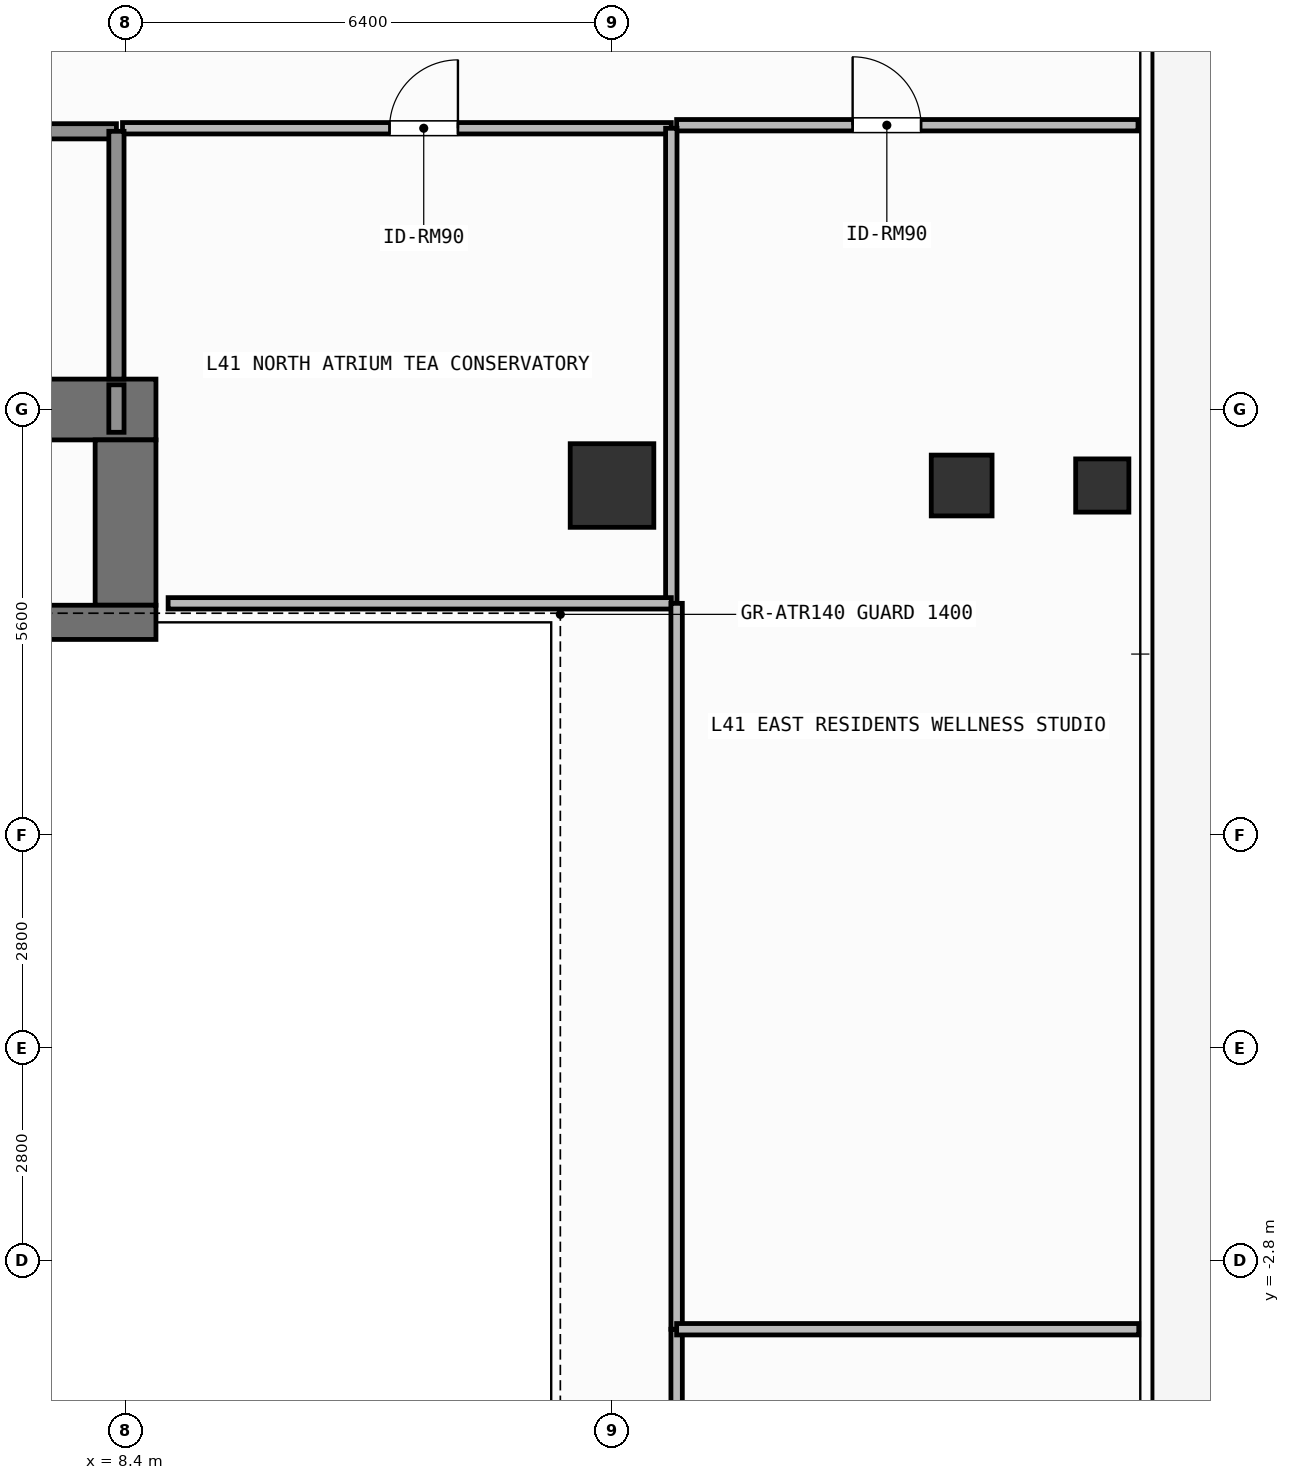
"""IFC4 building model, lengths in metres.
Left out: names, types, materials, properties, quantities, classifications, styles, units other than length and angle.
Written with IfcOpenShell. Run it as: python <this file> out.ifc"""

import sys

from ifc_helpers import new_model, si_unit, direction, frame, frame_2d, origin, origin_2d, place, context, subcontext, project, spatial, rectangle, hollow_rectangle, extrude, element, fill, save


model = new_model("IFC4")
c1 = context("Model", 3, precision=1e-05, world=origin(), true_north=direction((0.0, 1.0)))
c2 = subcontext(c1, "Body", "Model", "MODEL_VIEW")
j1 = project(units=[si_unit("LENGTHUNIT", "METRE"), si_unit("PLANEANGLEUNIT", "RADIAN")], contexts=[c1])
p1 = place(None, origin())
s1 = spatial("IfcSite", under=j1, at=p1, CompositionType="ELEMENT")
p2 = place(p1, origin())
s2 = spatial("IfcBuilding", under=s1, at=p2, CompositionType="ELEMENT")
p3 = place(p2, frame((0.0, 0.0, 168.0)))
s3 = spatial("IfcBuildingStorey", under=s2, at=p3, CompositionType="ELEMENT", Elevation=168.0)
p4 = place(p3, frame((-7.55, 8.4, 0.0), z_axis=(0.0, 0.0, 1.0), x_axis=(1.0, 0.0, 0.0)))
e1 = element("IfcWall", 1, at=p4, inside=s3, PredefinedType="SHEAR", context=c2, shape_type="SweptSolid", body=[
    extrude(rectangle(XDim=16.35, YDim=0.8, at=frame_2d((8.175, 0.0))), origin(), (0.0, 0.0, 1.0), 3.9),
])
p5 = place(p3, frame((8.4, 5.825, 0.0), z_axis=(0.0, 0.0, 1.0), x_axis=(0.0, 1.0, 0.0)))
e2 = element("IfcWall", 2, at=p5, inside=s3, PredefinedType="SHEAR", context=c2, shape_type="SweptSolid", body=[
    extrude(rectangle(XDim=2.175, YDim=0.8, at=frame_2d((1.087, 0.0))), origin(), (0.0, 0.0, 1.0), 3.9),
])
p6 = place(p3, frame((3.045, 5.6, 0.0), z_axis=(0.0, 0.0, 1.0), x_axis=(1.0, 0.0, 0.0)))
e3 = element("IfcWall", 3, at=p6, inside=s3, PredefinedType="SHEAR", context=c2, shape_type="SweptSolid", body=[
    extrude(rectangle(XDim=5.755, YDim=0.45, at=frame_2d((2.877, 0.0))), origin(), (0.0, 0.0, 1.0), 3.9),
])
p7 = place(p3, frame((14.8, 7.4, 0.0), z_axis=(0.0, 0.0, 1.0), x_axis=(1.0, 0.0, 0.0)))
e4 = element("IfcColumn", 4, at=p7, inside=s3, PredefinedType="COLUMN", context=c2, shape_type="SweptSolid", body=[
    extrude(rectangle(XDim=1.1, YDim=1.1, at=origin_2d()), origin(), (0.0, 0.0, 1.0), 3.9),
])
p8 = place(p3, frame((19.4, 7.4, 0.0), z_axis=(0.0, 0.0, 1.0), x_axis=(1.0, 0.0, 0.0)))
e5 = element("IfcColumn", 5, at=p8, inside=s3, PredefinedType="COLUMN", context=c2, shape_type="SweptSolid", body=[
    extrude(hollow_rectangle(XDim=0.8, YDim=0.8, WallThickness=0.036, at=origin_2d()), origin(), (0.0, 0.0, 1.0), 3.9),
])
p9 = place(p3, frame((21.25, 7.4, 0.0), z_axis=(0.0, 0.0, 1.0), x_axis=(1.0, 0.0, 0.0)))
e6 = element("IfcColumn", 6, at=p9, inside=s3, PredefinedType="COLUMN", context=c2, shape_type="SweptSolid", body=[
    extrude(hollow_rectangle(XDim=0.7, YDim=0.7, WallThickness=0.032, at=origin_2d()), origin(), (0.0, 0.0, 1.0), 3.9),
])
p10 = place(p3, frame((4.58, 12.06, 0.0), z_axis=(0.0, 0.0, 1.0), x_axis=(1.0, 0.0, 0.0)))
e7 = element("IfcWall", 7, at=p10, inside=s3, PredefinedType="SOLIDWALL", context=c2, shape_type="SweptSolid", body=[
    extrude(rectangle(XDim=3.7, YDim=0.2, at=frame_2d((1.85, 0.0))), origin(), (0.0, 0.0, 1.0), 3.68),
])
p11 = place(p10, frame((1.212, 0.0, 0.0)))
e8 = element("IfcOpeningElement", 8, at=p11, cuts=e7, PredefinedType="OPENING", context=c2, shape_type="SweptSolid", body=[
    extrude(rectangle(XDim=1.1, YDim=2.15, at=frame_2d((0.55, 1.075))), frame((0.0, 0.11, 0.0), z_axis=(0.0, -1.0, 0.0), x_axis=(1.0, 0.0, 0.0)), (0.0, 0.0, 1.0), 0.22),
])
p12 = place(p3, frame((8.36, 12.1, 0.0), z_axis=(0.0, 0.0, 1.0), x_axis=(1.0, 0.0, 0.0)))
e9 = element("IfcWall", 9, at=p12, inside=s3, PredefinedType="PARTITIONING", context=c2, shape_type="SweptSolid", body=[
    extrude(rectangle(XDim=7.22, YDim=0.15, at=frame_2d((3.61, 0.0))), origin(), (0.0, 0.0, 1.0), 3.68),
])
p13 = place(p12, frame((3.513, 0.0, 0.0)))
e10 = element("IfcOpeningElement", 10, at=p13, cuts=e9, PredefinedType="OPENING", context=c2, shape_type="SweptSolid", body=[
    extrude(rectangle(XDim=0.9, YDim=2.1, at=frame_2d((0.45, 1.05))), frame((0.0, 0.085, 0.0), z_axis=(0.0, -1.0, 0.0), x_axis=(1.0, 0.0, 0.0)), (0.0, 0.0, 1.0), 0.17),
])
p14 = place(p3, frame((15.65, 12.14, 0.0), z_axis=(0.0, 0.0, 1.0), x_axis=(1.0, 0.0, 0.0)))
e11 = element("IfcWall", 11, at=p14, inside=s3, PredefinedType="PARTITIONING", context=c2, shape_type="SweptSolid", body=[
    extrude(rectangle(XDim=6.07, YDim=0.15, at=frame_2d((3.035, 0.0))), origin(), (0.0, 0.0, 1.0), 3.68),
])
p15 = place(p14, frame((2.316, 0.0, 0.0)))
e12 = element("IfcOpeningElement", 12, at=p15, cuts=e11, PredefinedType="OPENING", context=c2, shape_type="SweptSolid", body=[
    extrude(rectangle(XDim=0.9, YDim=2.1, at=frame_2d((0.45, 1.05))), frame((0.0, 0.085, 0.0), z_axis=(0.0, -1.0, 0.0), x_axis=(1.0, 0.0, 0.0)), (0.0, 0.0, 1.0), 0.17),
])
p16 = place(p3, frame((8.28, 8.8, 0.0), z_axis=(0.0, 0.0, 1.0), x_axis=(0.0, 1.0, 0.0)))
e13 = element("IfcWall", 13, at=p16, inside=s3, PredefinedType="SOLIDWALL", context=c2, shape_type="SweptSolid", body=[
    extrude(rectangle(XDim=3.26, YDim=0.2, at=frame_2d((1.63, 0.0))), origin(), (0.0, 0.0, 1.0), 3.68),
])
p17 = place(p3, frame((8.28, 8.1, 0.0), z_axis=(0.0, 0.0, 1.0), x_axis=(0.0, 1.0, 0.0)))
e14 = element("IfcWall", 14, at=p17, inside=s3, PredefinedType="SOLIDWALL", context=c2, shape_type="SweptSolid", body=[
    extrude(rectangle(XDim=0.625, YDim=0.2, at=frame_2d((0.312, 0.0))), origin(), (0.0, 0.0, 1.0), 3.68),
])
p18 = place(p3, frame((15.58, 5.85, 0.0), z_axis=(0.0, 0.0, 1.0), x_axis=(0.0, 1.0, 0.0)))
e15 = element("IfcWall", 15, at=p18, inside=s3, PredefinedType="PARTITIONING", context=c2, shape_type="SweptSolid", body=[
    extrude(rectangle(XDim=6.25, YDim=0.15, at=frame_2d((3.125, 0.0))), origin(), (0.0, 0.0, 1.0), 3.68),
])
p19 = place(p3, frame((8.96, 5.85, 0.0), z_axis=(0.0, 0.0, 1.0), x_axis=(1.0, 0.0, 0.0)))
e16 = element("IfcWall", 16, at=p19, inside=s3, PredefinedType="PARTITIONING", context=c2, shape_type="SweptSolid", body=[
    extrude(rectangle(XDim=6.62, YDim=0.15, at=frame_2d((3.31, 0.0))), origin(), (0.0, 0.0, 1.0), 3.68),
])
p20 = place(p3, frame((15.65, -5.85, 0.0), z_axis=(0.0, 0.0, 1.0), x_axis=(0.0, 1.0, 0.0)))
e17 = element("IfcWall", 17, at=p20, inside=s3, PredefinedType="PARTITIONING", context=c2, shape_type="SweptSolid", body=[
    extrude(rectangle(XDim=2.15, YDim=0.15, at=frame_2d((1.075, 0.0))), origin(), (0.0, 0.0, 1.0), 3.68),
])
p21 = place(p3, frame((15.65, -3.7, 0.0), z_axis=(0.0, 0.0, 1.0), x_axis=(0.0, 1.0, 0.0)))
e18 = element("IfcWall", 18, at=p21, inside=s3, PredefinedType="PARTITIONING", context=c2, shape_type="SweptSolid", body=[
    extrude(rectangle(XDim=9.55, YDim=0.15, at=frame_2d((4.775, 0.0))), origin(), (0.0, 0.0, 1.0), 3.68),
])
p22 = place(p3, frame((15.65, -3.7, 0.0), z_axis=(0.0, 0.0, 1.0), x_axis=(1.0, 0.0, 0.0)))
e19 = element("IfcWall", 19, at=p22, inside=s3, PredefinedType="PARTITIONING", context=c2, shape_type="SweptSolid", body=[
    extrude(rectangle(XDim=6.08, YDim=0.15, at=frame_2d((3.04, 0.0))), origin(), (0.0, 0.0, 1.0), 3.68),
])
p23 = place(p13, origin())
e20 = element("IfcDoor", 20, at=p23, inside=s3, OperationType="SINGLE_SWING_RIGHT", PredefinedType="DOOR", context=c2, shape_type="SweptSolid", body=[
    extrude(rectangle(XDim=0.9, YDim=2.1, at=frame_2d((0.45, 1.05))), frame((0.0, 0.025, 0.0), z_axis=(0.0, -1.0, 0.0), x_axis=(1.0, 0.0, 0.0)), (0.0, 0.0, 1.0), 0.05),
])
fill(e10, e20)
p24 = place(p15, origin())
e21 = element("IfcDoor", 21, at=p24, inside=s3, OperationType="SINGLE_SWING_LEFT", PredefinedType="DOOR", context=c2, shape_type="SweptSolid", body=[
    extrude(rectangle(XDim=0.9, YDim=2.1, at=frame_2d((0.45, 1.05))), frame((0.0, 0.025, 0.0), z_axis=(0.0, -1.0, 0.0), x_axis=(1.0, 0.0, 0.0)), (0.0, 0.0, 1.0), 0.05),
])
fill(e12, e21)
save(model, sys.argv[1])
